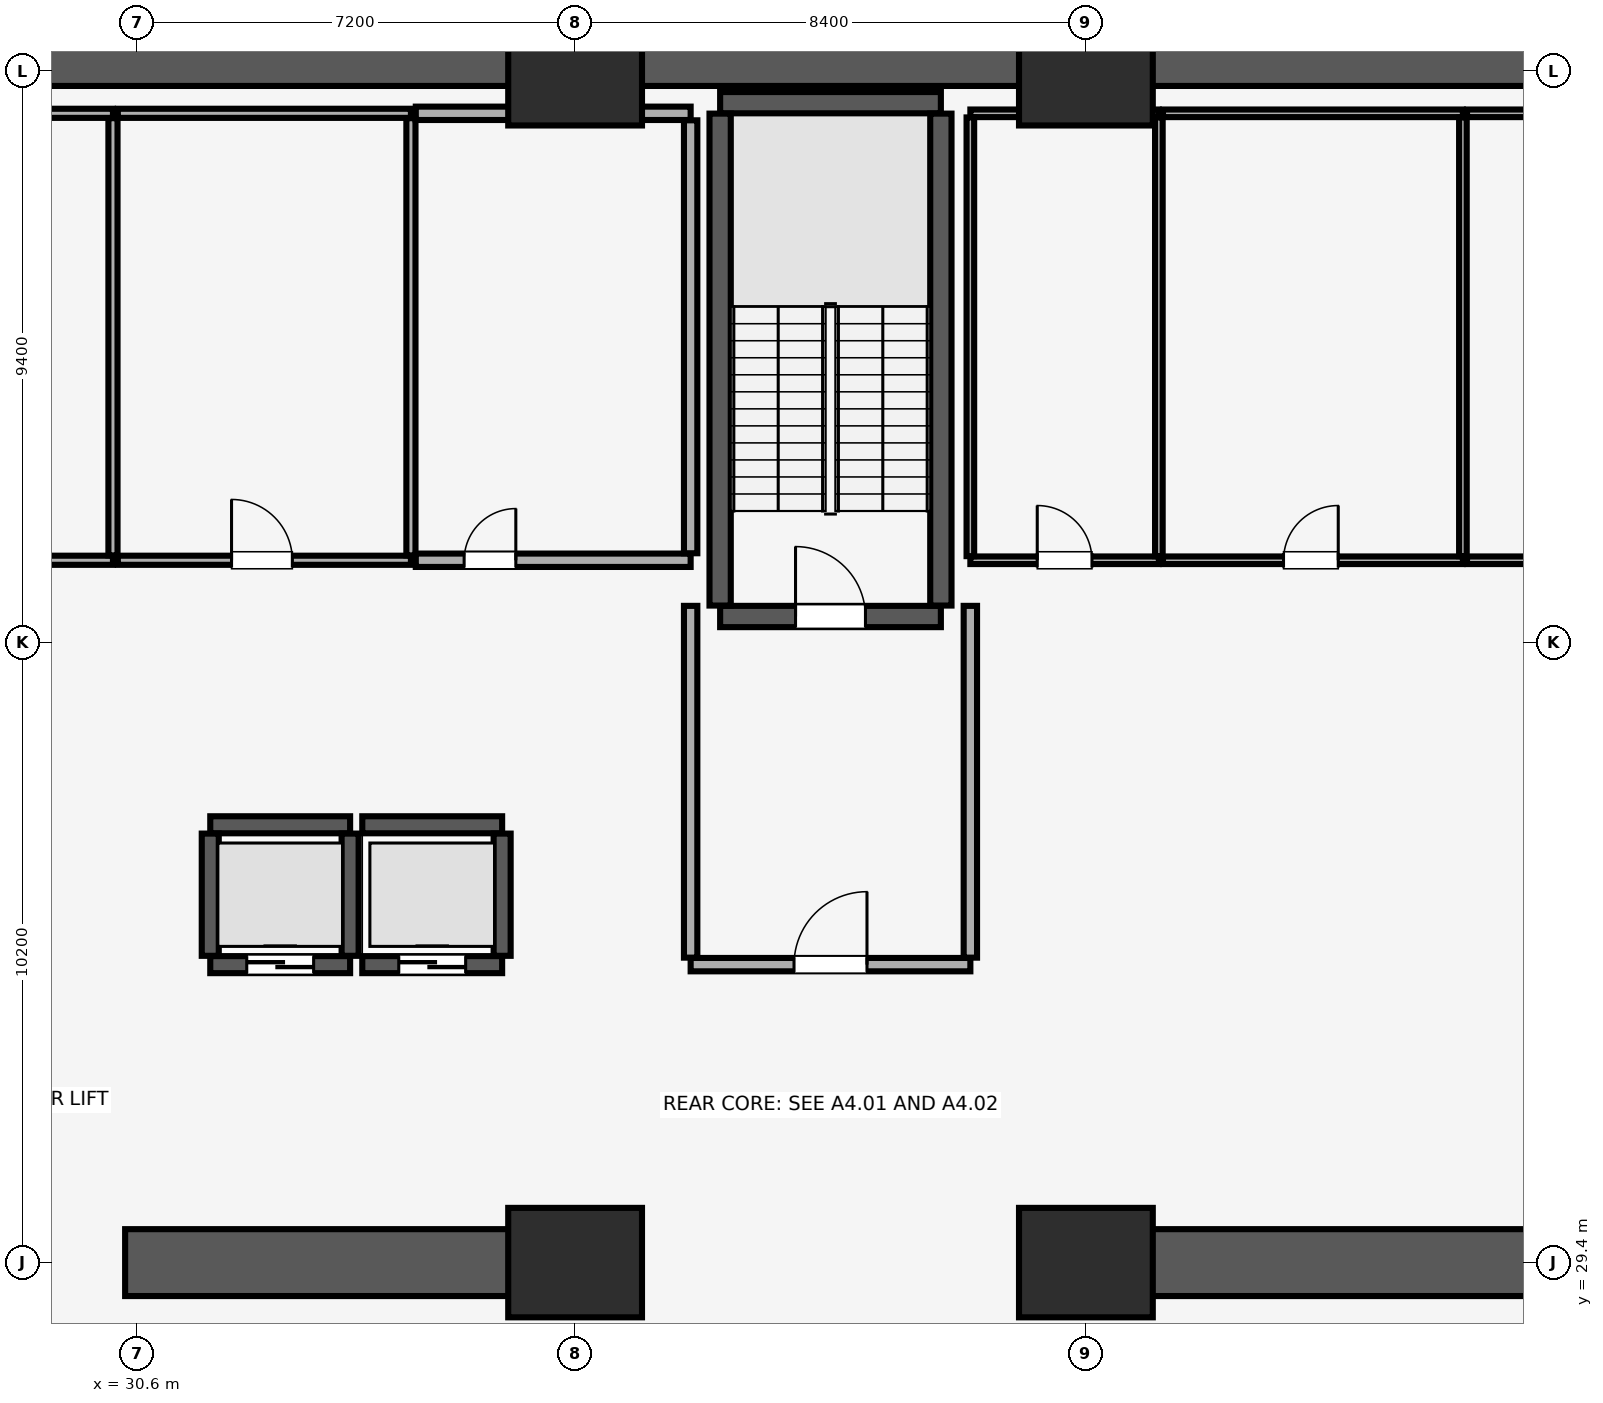
"""IFC4 building model, lengths in metres.
Left out: names, types, materials, properties, quantities, classifications, styles, units other than length and angle.
Written with IfcOpenShell. Run it as: python <this file> out.ifc"""

import sys

from ifc_helpers import new_model, si_unit, direction, frame, frame_2d, origin, origin_2d, place, context, subcontext, project, spatial, rectangle, extrude, element, fill, save


model = new_model("IFC4")
c1 = context("Model", 3, precision=1e-05, world=origin(), true_north=direction((0.0, 1.0)))
c2 = subcontext(c1, "Body", "Model", "MODEL_VIEW")
j1 = project(units=[si_unit("LENGTHUNIT", "METRE"), si_unit("PLANEANGLEUNIT", "RADIAN")], contexts=[c1])
p1 = place(None, origin())
s1 = spatial("IfcSite", under=j1, at=p1, CompositionType="ELEMENT")
p2 = place(p1, origin())
s2 = spatial("IfcBuilding", under=s1, at=p2, CompositionType="ELEMENT")
p3 = place(p2, frame((0.0, 0.0, -9.2)))
s3 = spatial("IfcBuildingStorey", under=s2, at=p3, CompositionType="ELEMENT", Elevation=-9.2)
for number, where, z_axis, x_axis in (
    (1, (37.8, 29.4, 0.0), (0.0, 0.0, 1.0), (1.0, 0.0, 0.0)),
    (2, (37.8, 49.0, 0.0), (0.0, 0.0, 1.0), (1.0, 0.0, 0.0)),
    (3, (46.2, 29.4, 0.0), (0.0, 0.0, 1.0), (1.0, 0.0, 0.0)),
    (4, (46.2, 49.0, 0.0), (0.0, 0.0, 1.0), (1.0, 0.0, 0.0)),
):
    element("IfcColumn", number, at=place(p3, frame(where, z_axis=z_axis, x_axis=x_axis)), inside=s3, PredefinedType="USERDEFINED", context=c2, shape_type="SweptSolid", body=[
        extrude(rectangle(XDim=2.2, YDim=1.8, at=origin_2d()), origin(), (0.0, 0.0, 1.0), 4.3),
    ])
p4 = place(p3, frame((16.2, 49.3, 0.0), z_axis=(0.0, 0.0, 1.0), x_axis=(1.0, 0.0, 0.0)))
e5 = element("IfcWall", 5, at=p4, inside=s3, PredefinedType="SHEAR", context=c2, shape_type="SweptSolid", body=[
    extrude(rectangle(XDim=51.6, YDim=1.1, at=frame_2d((25.8, 0.0))), origin(), (0.0, 0.0, 1.0), 4.3),
])
for number, where, z_axis, x_axis in (
    (6, (30.4, 29.4, 0.0), (0.0, 0.0, 1.0), (1.0, 0.0, 0.0)),
    (7, (46.0, 29.4, 0.0), (0.0, 0.0, 1.0), (1.0, 0.0, 0.0)),
):
    element("IfcWall", number, at=place(p3, frame(where, z_axis=z_axis, x_axis=x_axis)), inside=s3, PredefinedType="SHEAR", context=c2, shape_type="SweptSolid", body=[
        extrude(rectangle(XDim=7.6, YDim=1.1, at=frame_2d((3.8, 0.0))), origin(), (0.0, 0.0, 1.0), 4.3),
    ])
p5 = place(p3, frame((40.185, 40.025, 0.0), z_axis=(0.0, 0.0, 1.0), x_axis=(1.0, 0.0, 0.0)))
e8 = element("IfcWall", 8, at=p5, inside=s3, PredefinedType="SHEAR", context=c2, shape_type="SweptSolid", body=[
    extrude(rectangle(XDim=3.63, YDim=0.35, at=frame_2d((1.815, 0.0))), origin(), (0.0, 0.0, 1.0), 4.3),
])
p6 = place(p5, frame((1.24, 0.0, 0.0)))
e9 = element("IfcOpeningElement", 9, at=p6, cuts=e8, PredefinedType="OPENING", context=c2, shape_type="SweptSolid", body=[
    extrude(rectangle(XDim=1.15, YDim=2.15, at=frame_2d((0.575, 1.075))), frame((0.0, 0.185, 0.0), z_axis=(0.0, -1.0, 0.0), x_axis=(1.0, 0.0, 0.0)), (0.0, 0.0, 1.0), 0.37),
])
p7 = place(p3, frame((40.185, 48.475, 0.0), z_axis=(0.0, 0.0, 1.0), x_axis=(1.0, 0.0, 0.0)))
e10 = element("IfcWall", 10, at=p7, inside=s3, PredefinedType="SHEAR", context=c2, shape_type="SweptSolid", body=[
    extrude(rectangle(XDim=3.63, YDim=0.35, at=frame_2d((1.815, 0.0))), origin(), (0.0, 0.0, 1.0), 4.3),
])
for number, where, z_axis, x_axis in (
    (11, (40.185, 40.205, 0.0), (0.0, 0.0, 1.0), (0.0, 1.0, 0.0)),
    (12, (43.815, 40.205, 0.0), (0.0, 0.0, 1.0), (0.0, 1.0, 0.0)),
):
    element("IfcWall", number, at=place(p3, frame(where, z_axis=z_axis, x_axis=x_axis)), inside=s3, PredefinedType="SHEAR", context=c2, shape_type="SweptSolid", body=[
        extrude(rectangle(XDim=8.09, YDim=0.35, at=frame_2d((4.045, 0.0))), origin(), (0.0, 0.0, 1.0), 4.3),
    ])
p8 = place(p3, frame((31.8, 34.3, 0.0), z_axis=(0.0, 0.0, 1.0), x_axis=(1.0, 0.0, 0.0)))
e13 = element("IfcWall", 13, at=p8, inside=s3, PredefinedType="SHEAR", context=c2, shape_type="SweptSolid", body=[
    extrude(rectangle(XDim=2.3, YDim=0.28, at=frame_2d((1.15, 0.0))), origin(), (0.0, 0.0, 1.0), 4.3),
])
p9 = place(p8, frame((0.6, 0.0, 0.0)))
e14 = element("IfcOpeningElement", 14, at=p9, cuts=e13, PredefinedType="OPENING", context=c2, shape_type="SweptSolid", body=[
    extrude(rectangle(XDim=1.1, YDim=2.2, at=frame_2d((0.55, 1.1))), frame((0.0, 0.15, 0.0), z_axis=(0.0, -1.0, 0.0), x_axis=(1.0, 0.0, 0.0)), (0.0, 0.0, 1.0), 0.3),
])
p10 = place(p3, frame((31.8, 36.6, 0.0), z_axis=(0.0, 0.0, 1.0), x_axis=(1.0, 0.0, 0.0)))
e15 = element("IfcWall", 15, at=p10, inside=s3, PredefinedType="SHEAR", context=c2, shape_type="SweptSolid", body=[
    extrude(rectangle(XDim=2.3, YDim=0.28, at=frame_2d((1.15, 0.0))), origin(), (0.0, 0.0, 1.0), 4.3),
])
for number, where, z_axis, x_axis in (
    (16, (31.8, 34.445, 0.0), (0.0, 0.0, 1.0), (0.0, 1.0, 0.0)),
    (17, (34.1, 34.445, 0.0), (0.0, 0.0, 1.0), (0.0, 1.0, 0.0)),
):
    element("IfcWall", number, at=place(p3, frame(where, z_axis=z_axis, x_axis=x_axis)), inside=s3, PredefinedType="SHEAR", context=c2, shape_type="SweptSolid", body=[
        extrude(rectangle(XDim=2.01, YDim=0.28, at=frame_2d((1.005, 0.0))), origin(), (0.0, 0.0, 1.0), 4.3),
    ])
p11 = place(p3, frame((34.3, 34.3, 0.0), z_axis=(0.0, 0.0, 1.0), x_axis=(1.0, 0.0, 0.0)))
e18 = element("IfcWall", 18, at=p11, inside=s3, PredefinedType="SHEAR", context=c2, shape_type="SweptSolid", body=[
    extrude(rectangle(XDim=2.3, YDim=0.28, at=frame_2d((1.15, 0.0))), origin(), (0.0, 0.0, 1.0), 4.3),
])
p12 = place(p11, frame((0.6, 0.0, 0.0)))
e19 = element("IfcOpeningElement", 19, at=p12, cuts=e18, PredefinedType="OPENING", context=c2, shape_type="SweptSolid", body=[
    extrude(rectangle(XDim=1.1, YDim=2.2, at=frame_2d((0.55, 1.1))), frame((0.0, 0.15, 0.0), z_axis=(0.0, -1.0, 0.0), x_axis=(1.0, 0.0, 0.0)), (0.0, 0.0, 1.0), 0.3),
])
p13 = place(p3, frame((34.3, 36.6, 0.0), z_axis=(0.0, 0.0, 1.0), x_axis=(1.0, 0.0, 0.0)))
e20 = element("IfcWall", 20, at=p13, inside=s3, PredefinedType="SHEAR", context=c2, shape_type="SweptSolid", body=[
    extrude(rectangle(XDim=2.3, YDim=0.28, at=frame_2d((1.15, 0.0))), origin(), (0.0, 0.0, 1.0), 4.3),
])
p14 = place(p3, frame((36.6, 34.445, 0.0), z_axis=(0.0, 0.0, 1.0), x_axis=(0.0, 1.0, 0.0)))
e21 = element("IfcWall", 21, at=p14, inside=s3, PredefinedType="SHEAR", context=c2, shape_type="SweptSolid", body=[
    extrude(rectangle(XDim=2.01, YDim=0.28, at=frame_2d((1.005, 0.0))), origin(), (0.0, 0.0, 1.0), 4.3),
])
p15 = place(p3, frame((39.7, 34.3, 0.0), z_axis=(0.0, 0.0, 1.0), x_axis=(1.0, 0.0, 0.0)))
e22 = element("IfcWall", 22, at=p15, inside=s3, PredefinedType="PARTITIONING", context=c2, shape_type="SweptSolid", body=[
    extrude(rectangle(XDim=4.6, YDim=0.22, at=frame_2d((2.3, 0.0))), origin(), (0.0, 0.0, 1.0), 4.3),
])
p16 = place(p15, frame((1.7, 0.0, 0.0)))
e23 = element("IfcOpeningElement", 23, at=p16, cuts=e22, PredefinedType="OPENING", context=c2, shape_type="SweptSolid", body=[
    extrude(rectangle(XDim=1.2, YDim=2.15, at=frame_2d((0.6, 1.075))), frame((0.0, 0.12, 0.0), z_axis=(0.0, -1.0, 0.0), x_axis=(1.0, 0.0, 0.0)), (0.0, 0.0, 1.0), 0.24),
])
for number, where, z_axis, x_axis in (
    (24, (39.7, 34.415, 0.0), (0.0, 0.0, 1.0), (0.0, 1.0, 0.0)),
    (25, (44.3, 34.415, 0.0), (0.0, 0.0, 1.0), (0.0, 1.0, 0.0)),
):
    element("IfcWall", number, at=place(p3, frame(where, z_axis=z_axis, x_axis=x_axis)), inside=s3, PredefinedType="PARTITIONING", context=c2, shape_type="SweptSolid", body=[
        extrude(rectangle(XDim=5.785, YDim=0.22, at=frame_2d((2.893, 0.0))), origin(), (0.0, 0.0, 1.0), 4.3),
    ])
p17 = place(p3, frame((25.0, 40.95, 0.0), z_axis=(0.0, 0.0, 1.0), x_axis=(1.0, 0.0, 0.0)))
e26 = element("IfcWall", 26, at=p17, inside=s3, PredefinedType="PARTITIONING", context=c2, shape_type="SweptSolid", body=[
    extrude(rectangle(XDim=5.2, YDim=0.15, at=frame_2d((2.6, 0.0))), origin(), (0.0, 0.0, 1.0), 4.3),
])
p18 = place(p17, frame((2.175, 0.0, 0.0)))
e27 = element("IfcOpeningElement", 27, at=p18, cuts=e26, PredefinedType="OPENING", context=c2, shape_type="SweptSolid", body=[
    extrude(rectangle(XDim=0.85, YDim=2.1, at=frame_2d((0.425, 1.05))), frame((0.0, 0.085, 0.0), z_axis=(0.0, -1.0, 0.0), x_axis=(1.0, 0.0, 0.0)), (0.0, 0.0, 1.0), 0.17),
])
p19 = place(p3, frame((25.0, 48.3, 0.0), z_axis=(0.0, 0.0, 1.0), x_axis=(1.0, 0.0, 0.0)))
e28 = element("IfcWall", 28, at=p19, inside=s3, PredefinedType="PARTITIONING", context=c2, shape_type="SweptSolid", body=[
    extrude(rectangle(XDim=5.2, YDim=0.15, at=frame_2d((2.6, 0.0))), origin(), (0.0, 0.0, 1.0), 4.3),
])
p20 = place(p3, frame((30.2, 41.03, 0.0), z_axis=(0.0, 0.0, 1.0), x_axis=(0.0, 1.0, 0.0)))
e29 = element("IfcWall", 29, at=p20, inside=s3, PredefinedType="PARTITIONING", context=c2, shape_type="SweptSolid", body=[
    extrude(rectangle(XDim=7.19, YDim=0.15, at=frame_2d((3.595, 0.0))), origin(), (0.0, 0.0, 1.0), 4.3),
])
p21 = place(p3, frame((30.28, 40.95, 0.0), z_axis=(0.0, 0.0, 1.0), x_axis=(1.0, 0.0, 0.0)))
e30 = element("IfcWall", 30, at=p21, inside=s3, PredefinedType="PARTITIONING", context=c2, shape_type="SweptSolid", body=[
    extrude(rectangle(XDim=4.82, YDim=0.15, at=frame_2d((2.41, 0.0))), origin(), (0.0, 0.0, 1.0), 4.3),
])
p22 = place(p21, frame((1.87, 0.0, 0.0)))
e31 = element("IfcOpeningElement", 31, at=p22, cuts=e30, PredefinedType="OPENING", context=c2, shape_type="SweptSolid", body=[
    extrude(rectangle(XDim=1.0, YDim=2.15, at=frame_2d((0.5, 1.075))), frame((0.0, 0.085, 0.0), z_axis=(0.0, -1.0, 0.0), x_axis=(1.0, 0.0, 0.0)), (0.0, 0.0, 1.0), 0.17),
])
p23 = place(p3, frame((30.28, 48.3, 0.0), z_axis=(0.0, 0.0, 1.0), x_axis=(1.0, 0.0, 0.0)))
e32 = element("IfcWall", 32, at=p23, inside=s3, PredefinedType="PARTITIONING", context=c2, shape_type="SweptSolid", body=[
    extrude(rectangle(XDim=4.82, YDim=0.15, at=frame_2d((2.41, 0.0))), origin(), (0.0, 0.0, 1.0), 4.3),
])
p24 = place(p3, frame((35.1, 41.03, 0.0), z_axis=(0.0, 0.0, 1.0), x_axis=(0.0, 1.0, 0.0)))
e33 = element("IfcWall", 33, at=p24, inside=s3, PredefinedType="PARTITIONING", context=c2, shape_type="SweptSolid", body=[
    extrude(rectangle(XDim=7.19, YDim=0.15, at=frame_2d((3.595, 0.0))), origin(), (0.0, 0.0, 1.0), 4.3),
])
p25 = place(p3, frame((35.18, 40.95, 0.0), z_axis=(0.0, 0.0, 1.0), x_axis=(1.0, 0.0, 0.0)))
e34 = element("IfcWall", 34, at=p25, inside=s3, PredefinedType="PARTITIONING", context=c2, shape_type="SweptSolid", body=[
    extrude(rectangle(XDim=4.52, YDim=0.22, at=frame_2d((2.26, 0.0))), origin(), (0.0, 0.0, 1.0), 4.3),
])
p26 = place(p25, frame((0.795, 0.0, 0.0)))
e35 = element("IfcOpeningElement", 35, at=p26, cuts=e34, PredefinedType="OPENING", context=c2, shape_type="SweptSolid", body=[
    extrude(rectangle(XDim=0.85, YDim=2.1, at=frame_2d((0.425, 1.05))), frame((0.0, 0.12, 0.0), z_axis=(0.0, -1.0, 0.0), x_axis=(1.0, 0.0, 0.0)), (0.0, 0.0, 1.0), 0.24),
])
p27 = place(p3, frame((35.18, 48.3, 0.0), z_axis=(0.0, 0.0, 1.0), x_axis=(1.0, 0.0, 0.0)))
e36 = element("IfcWall", 36, at=p27, inside=s3, PredefinedType="PARTITIONING", context=c2, shape_type="SweptSolid", body=[
    extrude(rectangle(XDim=4.52, YDim=0.22, at=frame_2d((2.26, 0.0))), origin(), (0.0, 0.0, 1.0), 4.3),
])
p28 = place(p3, frame((39.7, 41.065, 0.0), z_axis=(0.0, 0.0, 1.0), x_axis=(0.0, 1.0, 0.0)))
e37 = element("IfcWall", 37, at=p28, inside=s3, PredefinedType="PARTITIONING", context=c2, shape_type="SweptSolid", body=[
    extrude(rectangle(XDim=7.12, YDim=0.22, at=frame_2d((3.56, 0.0))), origin(), (0.0, 0.0, 1.0), 4.3),
])
p29 = place(p3, frame((44.3, 40.95, 0.0), z_axis=(0.0, 0.0, 1.0), x_axis=(1.0, 0.0, 0.0)))
e38 = element("IfcWall", 38, at=p29, inside=s3, PredefinedType="PARTITIONING", context=c2, shape_type="SweptSolid", body=[
    extrude(rectangle(XDim=3.1, YDim=0.125, at=frame_2d((1.55, 0.0))), origin(), (0.0, 0.0, 1.0), 4.3),
])
p30 = place(p29, frame((1.1, 0.0, 0.0)))
e39 = element("IfcOpeningElement", 39, at=p30, cuts=e38, PredefinedType="OPENING", context=c2, shape_type="SweptSolid", body=[
    extrude(rectangle(XDim=0.9, YDim=2.1, at=frame_2d((0.45, 1.05))), frame((0.0, 0.073, 0.0), z_axis=(0.0, -1.0, 0.0), x_axis=(1.0, 0.0, 0.0)), (0.0, 0.0, 1.0), 0.145),
])
p31 = place(p3, frame((44.3, 48.3, 0.0), z_axis=(0.0, 0.0, 1.0), x_axis=(1.0, 0.0, 0.0)))
e40 = element("IfcWall", 40, at=p31, inside=s3, PredefinedType="PARTITIONING", context=c2, shape_type="SweptSolid", body=[
    extrude(rectangle(XDim=3.1, YDim=0.125, at=frame_2d((1.55, 0.0))), origin(), (0.0, 0.0, 1.0), 4.3),
])
for number, where, z_axis, x_axis in (
    (41, (44.3, 41.018, 0.0), (0.0, 0.0, 1.0), (0.0, 1.0, 0.0)),
    (42, (47.4, 41.018, 0.0), (0.0, 0.0, 1.0), (0.0, 1.0, 0.0)),
):
    element("IfcWall", number, at=place(p3, frame(where, z_axis=z_axis, x_axis=x_axis)), inside=s3, PredefinedType="PARTITIONING", context=c2, shape_type="SweptSolid", body=[
        extrude(rectangle(XDim=7.215, YDim=0.125, at=frame_2d((3.607, 0.0))), origin(), (0.0, 0.0, 1.0), 4.3),
    ])
p32 = place(p3, frame((47.468, 40.95, 0.0), z_axis=(0.0, 0.0, 1.0), x_axis=(1.0, 0.0, 0.0)))
e43 = element("IfcWall", 43, at=p32, inside=s3, PredefinedType="PARTITIONING", context=c2, shape_type="SweptSolid", body=[
    extrude(rectangle(XDim=4.932, YDim=0.125, at=frame_2d((2.466, 0.0))), origin(), (0.0, 0.0, 1.0), 4.3),
])
p33 = place(p32, frame((1.982, 0.0, 0.0)))
e44 = element("IfcOpeningElement", 44, at=p33, cuts=e43, PredefinedType="OPENING", context=c2, shape_type="SweptSolid", body=[
    extrude(rectangle(XDim=0.9, YDim=2.1, at=frame_2d((0.45, 1.05))), frame((0.0, 0.073, 0.0), z_axis=(0.0, -1.0, 0.0), x_axis=(1.0, 0.0, 0.0)), (0.0, 0.0, 1.0), 0.145),
])
p34 = place(p3, frame((47.468, 48.3, 0.0), z_axis=(0.0, 0.0, 1.0), x_axis=(1.0, 0.0, 0.0)))
e45 = element("IfcWall", 45, at=p34, inside=s3, PredefinedType="PARTITIONING", context=c2, shape_type="SweptSolid", body=[
    extrude(rectangle(XDim=4.932, YDim=0.125, at=frame_2d((2.466, 0.0))), origin(), (0.0, 0.0, 1.0), 4.3),
])
p35 = place(p3, frame((52.4, 41.018, 0.0), z_axis=(0.0, 0.0, 1.0), x_axis=(0.0, 1.0, 0.0)))
e46 = element("IfcWall", 46, at=p35, inside=s3, PredefinedType="PARTITIONING", context=c2, shape_type="SweptSolid", body=[
    extrude(rectangle(XDim=7.215, YDim=0.125, at=frame_2d((3.607, 0.0))), origin(), (0.0, 0.0, 1.0), 4.3),
])
p36 = place(p3, frame((52.468, 40.95, 0.0), z_axis=(0.0, 0.0, 1.0), x_axis=(1.0, 0.0, 0.0)))
e47 = element("IfcWall", 47, at=p36, inside=s3, PredefinedType="PARTITIONING", context=c2, shape_type="SweptSolid", body=[
    extrude(rectangle(XDim=5.032, YDim=0.125, at=frame_2d((2.516, 0.0))), origin(), (0.0, 0.0, 1.0), 4.3),
])
p37 = place(p36, frame((2.032, 0.0, 0.0)))
e48 = element("IfcOpeningElement", 48, at=p37, cuts=e47, PredefinedType="OPENING", context=c2, shape_type="SweptSolid", body=[
    extrude(rectangle(XDim=0.9, YDim=2.1, at=frame_2d((0.45, 1.05))), frame((0.0, 0.073, 0.0), z_axis=(0.0, -1.0, 0.0), x_axis=(1.0, 0.0, 0.0)), (0.0, 0.0, 1.0), 0.145),
])
p38 = place(p3, frame((52.468, 48.3, 0.0), z_axis=(0.0, 0.0, 1.0), x_axis=(1.0, 0.0, 0.0)))
e49 = element("IfcWall", 49, at=p38, inside=s3, PredefinedType="PARTITIONING", context=c2, shape_type="SweptSolid", body=[
    extrude(rectangle(XDim=5.022, YDim=0.125, at=frame_2d((2.511, 0.0))), origin(), (0.0, 0.0, 1.0), 4.3),
])
p39 = place(p6, origin())
e50 = element("IfcDoor", 50, at=p39, inside=s3, OperationType="SINGLE_SWING_LEFT", PredefinedType="DOOR", context=c2, shape_type="SweptSolid", body=[
    extrude(rectangle(XDim=1.15, YDim=2.15, at=frame_2d((0.575, 1.075))), frame((0.0, 0.025, 0.0), z_axis=(0.0, -1.0, 0.0), x_axis=(1.0, 0.0, 0.0)), (0.0, 0.0, 1.0), 0.05),
])
fill(e9, e50)
p40 = place(p9, origin())
e51 = element("IfcDoor", 51, at=p40, inside=s3, OperationType="DOUBLE_DOOR_SLIDING", PredefinedType="DOOR", context=c2, shape_type="SweptSolid", body=[
    extrude(rectangle(XDim=1.1, YDim=2.2, at=frame_2d((0.55, 1.1))), frame((0.0, 0.025, 0.0), z_axis=(0.0, -1.0, 0.0), x_axis=(1.0, 0.0, 0.0)), (0.0, 0.0, 1.0), 0.05),
])
fill(e14, e51)
p41 = place(p12, origin())
e52 = element("IfcDoor", 52, at=p41, inside=s3, OperationType="DOUBLE_DOOR_SLIDING", PredefinedType="DOOR", context=c2, shape_type="SweptSolid", body=[
    extrude(rectangle(XDim=1.1, YDim=2.2, at=frame_2d((0.55, 1.1))), frame((0.0, 0.025, 0.0), z_axis=(0.0, -1.0, 0.0), x_axis=(1.0, 0.0, 0.0)), (0.0, 0.0, 1.0), 0.05),
])
fill(e19, e52)
p42 = place(p16, origin())
e53 = element("IfcDoor", 53, at=p42, inside=s3, OperationType="SINGLE_SWING_RIGHT", PredefinedType="DOOR", context=c2, shape_type="SweptSolid", body=[
    extrude(rectangle(XDim=1.2, YDim=2.15, at=frame_2d((0.6, 1.075))), frame((0.0, 0.025, 0.0), z_axis=(0.0, -1.0, 0.0), x_axis=(1.0, 0.0, 0.0)), (0.0, 0.0, 1.0), 0.05),
])
fill(e23, e53)
p43 = place(p22, origin())
e54 = element("IfcDoor", 54, at=p43, inside=s3, OperationType="SINGLE_SWING_LEFT", PredefinedType="DOOR", context=c2, shape_type="SweptSolid", body=[
    extrude(rectangle(XDim=1.0, YDim=2.15, at=frame_2d((0.5, 1.075))), frame((0.0, 0.025, 0.0), z_axis=(0.0, -1.0, 0.0), x_axis=(1.0, 0.0, 0.0)), (0.0, 0.0, 1.0), 0.05),
])
fill(e31, e54)
p44 = place(p26, origin())
e55 = element("IfcDoor", 55, at=p44, inside=s3, OperationType="SINGLE_SWING_RIGHT", PredefinedType="DOOR", context=c2, shape_type="SweptSolid", body=[
    extrude(rectangle(XDim=0.85, YDim=2.1, at=frame_2d((0.425, 1.05))), frame((0.0, 0.025, 0.0), z_axis=(0.0, -1.0, 0.0), x_axis=(1.0, 0.0, 0.0)), (0.0, 0.0, 1.0), 0.05),
])
fill(e35, e55)
p45 = place(p30, origin())
e56 = element("IfcDoor", 56, at=p45, inside=s3, OperationType="SINGLE_SWING_LEFT", PredefinedType="DOOR", context=c2, shape_type="SweptSolid", body=[
    extrude(rectangle(XDim=0.9, YDim=2.1, at=frame_2d((0.45, 1.05))), frame((0.0, 0.025, 0.0), z_axis=(0.0, -1.0, 0.0), x_axis=(1.0, 0.0, 0.0)), (0.0, 0.0, 1.0), 0.05),
])
fill(e39, e56)
p46 = place(p33, origin())
e57 = element("IfcDoor", 57, at=p46, inside=s3, OperationType="SINGLE_SWING_RIGHT", PredefinedType="DOOR", context=c2, shape_type="SweptSolid", body=[
    extrude(rectangle(XDim=0.9, YDim=2.1, at=frame_2d((0.45, 1.05))), frame((0.0, 0.025, 0.0), z_axis=(0.0, -1.0, 0.0), x_axis=(1.0, 0.0, 0.0)), (0.0, 0.0, 1.0), 0.05),
])
fill(e44, e57)
save(model, sys.argv[1])
